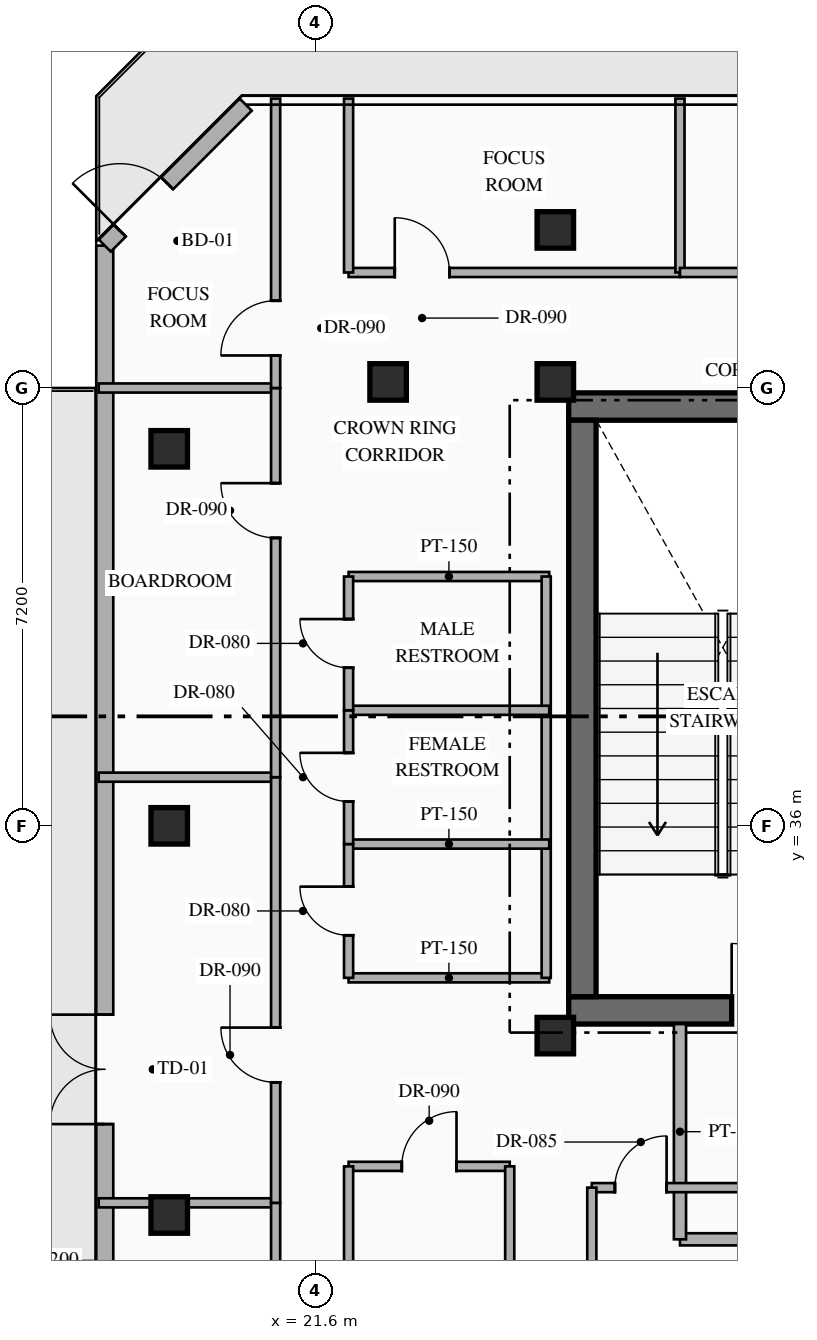
"""IFC4 building model, lengths in metres.
Left out: names, types, materials, properties, quantities, classifications, styles, units other than length and angle.
Written with IfcOpenShell. Run it as: python <this file> out.ifc"""

import sys

from ifc_helpers import new_model, si_unit, direction, frame, frame_2d, origin, origin_2d, place, context, subcontext, project, spatial, rectangle, hollow_rectangle, extrude, element, fill, save


model = new_model("IFC4")
c1 = context("Model", 3, precision=1e-05, world=origin(), true_north=direction((0.0, 1.0)))
c2 = subcontext(c1, "Body", "Model", "MODEL_VIEW")
j1 = project(units=[si_unit("LENGTHUNIT", "METRE"), si_unit("PLANEANGLEUNIT", "RADIAN")], contexts=[c1])
p1 = place(None, origin())
s1 = spatial("IfcSite", under=j1, at=p1, CompositionType="ELEMENT")
p2 = place(p1, origin())
s2 = spatial("IfcBuilding", under=s1, at=p2, CompositionType="ELEMENT")
p3 = place(p2, frame((0.0, 0.0, 265.95)))
s3 = spatial("IfcBuildingStorey", under=s2, at=p3, CompositionType="ELEMENT", Elevation=265.95)
p4 = place(p3, frame((25.77, 32.965, 0.0), z_axis=(0.0, 0.0, 1.0), x_axis=(1.0, 0.0, 0.0)))
e1 = element("IfcWall", 1, at=p4, inside=s3, PredefinedType="SHEAR", context=c2, shape_type="SweptSolid", body=[
    extrude(rectangle(XDim=7.48, YDim=0.45, at=frame_2d((3.74, 0.0))), origin(), (0.0, 0.0, 1.0), 4.0),
])
p5 = place(p4, frame((2.68, 0.0, 0.0)))
e2 = element("IfcOpeningElement", 2, at=p5, cuts=e1, PredefinedType="OPENING", context=c2, shape_type="SweptSolid", body=[
    extrude(rectangle(XDim=1.1, YDim=2.2, at=frame_2d((0.55, 1.1))), frame((0.0, 0.235, 0.0), z_axis=(0.0, -1.0, 0.0), x_axis=(1.0, 0.0, 0.0)), (0.0, 0.0, 1.0), 0.47),
])
p6 = place(p4, frame((5.43, 0.0, 0.0)))
e3 = element("IfcOpeningElement", 3, at=p6, cuts=e1, PredefinedType="OPENING", context=c2, shape_type="SweptSolid", body=[
    extrude(rectangle(XDim=1.1, YDim=2.15, at=frame_2d((0.55, 1.075))), frame((0.0, 0.235, 0.0), z_axis=(0.0, -1.0, 0.0), x_axis=(1.0, 0.0, 0.0)), (0.0, 0.0, 1.0), 0.47),
])
p7 = place(p3, frame((25.77, 42.895, 0.0), z_axis=(0.0, 0.0, 1.0), x_axis=(1.0, 0.0, 0.0)))
e4 = element("IfcWall", 4, at=p7, inside=s3, PredefinedType="SHEAR", context=c2, shape_type="SweptSolid", body=[
    extrude(rectangle(XDim=7.48, YDim=0.45, at=frame_2d((3.74, 0.0))), origin(), (0.0, 0.0, 1.0), 4.0),
])
p8 = place(p3, frame((25.995, 33.19, 0.0), z_axis=(0.0, 0.0, 1.0), x_axis=(0.0, 1.0, 0.0)))
e5 = element("IfcWall", 5, at=p8, inside=s3, PredefinedType="SHEAR", context=c2, shape_type="SweptSolid", body=[
    extrude(rectangle(XDim=9.48, YDim=0.45, at=frame_2d((4.74, 0.0))), origin(), (0.0, 0.0, 1.0), 4.0),
])
for number, where, z_axis, x_axis in (
    (6, (25.55, 32.55, 0.0), (0.0, 0.0, 1.0), (1.0, 0.0, 0.0)),
    (7, (25.55, 43.3, 0.0), (0.0, 0.0, 1.0), (1.0, 0.0, 0.0)),
    (8, (25.55, 45.8, 0.0), (0.0, 0.0, 1.0), (1.0, 0.0, 0.0)),
    (9, (19.2, 29.6, 0.0), (0.0, 0.0, 1.0), (1.0, 0.0, 0.0)),
    (10, (19.2, 42.2, 0.0), (0.0, 0.0, 1.0), (1.0, 0.0, 0.0)),
    (11, (22.8, 43.3, 0.0), (0.0, 0.0, 1.0), (1.0, 0.0, 0.0)),
    (12, (19.2, 36.0, 0.0), (0.0, 0.0, 1.0), (1.0, 0.0, 0.0)),
):
    element("IfcColumn", number, at=place(p3, frame(where, z_axis=z_axis, x_axis=x_axis)), inside=s3, PredefinedType="COLUMN", context=c2, shape_type="SweptSolid", body=[
        extrude(hollow_rectangle(XDim=0.6, YDim=0.6, WallThickness=0.025, at=origin_2d()), origin(), (0.0, 0.0, 1.0), 4.0),
    ])
p9 = place(p3, frame((18.14, 25.858, 0.0), z_axis=(0.0, 0.0, 1.0), x_axis=(0.0, 1.0, 0.0)))
e13 = element("IfcWall", 13, at=p9, inside=s3, PredefinedType="STANDARD", context=c2, shape_type="SweptSolid", body=[
    extrude(rectangle(XDim=19.684, YDim=0.28, at=frame_2d((9.842, 0.0))), origin(), (0.0, 0.0, 1.0), 3.75),
])
p10 = place(p9, frame((5.237, 0.0, 0.0)))
e14 = element("IfcOpeningElement", 14, at=p10, cuts=e13, PredefinedType="OPENING", context=c2, shape_type="SweptSolid", body=[
    extrude(rectangle(XDim=1.8, YDim=2.25, at=frame_2d((0.9, 1.125))), frame((0.0, 0.15, 0.0), z_axis=(0.0, -1.0, 0.0), x_axis=(1.0, 0.0, 0.0)), (0.0, 0.0, 1.0), 0.3),
])
p11 = place(p3, frame((18.14, 45.542, 0.0), z_axis=(0.0, 0.0, 1.0), x_axis=(0.707106781187, 0.707106781187, 0.0)))
e15 = element("IfcWall", 15, at=p11, inside=s3, PredefinedType="STANDARD", context=c2, shape_type="SweptSolid", body=[
    extrude(rectangle(XDim=3.278, YDim=0.28, at=frame_2d((1.639, 0.0))), origin(), (0.0, 0.0, 1.0), 3.75),
])
p12 = place(p11, frame((0.35, 0.0, 0.0)))
e16 = element("IfcOpeningElement", 16, at=p12, cuts=e15, PredefinedType="OPENING", context=c2, shape_type="SweptSolid", body=[
    extrude(rectangle(XDim=1.1, YDim=2.2, at=frame_2d((0.55, 1.1))), frame((0.0, 0.15, 0.0), z_axis=(0.0, -1.0, 0.0), x_axis=(1.0, 0.0, 0.0)), (0.0, 0.0, 1.0), 0.3),
])
p13 = place(p3, frame((27.6, 29.2, 0.0), z_axis=(0.0, 0.0, 1.0), x_axis=(1.0, 0.0, 0.0)))
e17 = element("IfcWall", 17, at=p13, inside=s3, PredefinedType="STANDARD", context=c2, shape_type="SweptSolid", body=[
    extrude(rectangle(XDim=5.15, YDim=0.2, at=frame_2d((2.575, 0.0))), origin(), (0.0, 0.0, 1.0), 3.75),
])
p14 = place(p3, frame((27.6, 29.2, 0.0), z_axis=(0.0, 0.0, 1.0), x_axis=(0.0, 1.0, 0.0)))
e18 = element("IfcWall", 18, at=p14, inside=s3, PredefinedType="STANDARD", context=c2, shape_type="SweptSolid", body=[
    extrude(rectangle(XDim=3.54, YDim=0.2, at=frame_2d((1.77, 0.0))), origin(), (0.0, 0.0, 1.0), 3.75),
])
for number, where, z_axis, x_axis in (
    (19, (22.15, 33.5, 0.0), (0.0, 0.0, 1.0), (1.0, 0.0, 0.0)),
    (20, (22.15, 40.1, 0.0), (0.0, 0.0, 1.0), (1.0, 0.0, 0.0)),
):
    element("IfcWall", number, at=place(p3, frame(where, z_axis=z_axis, x_axis=x_axis)), inside=s3, PredefinedType="PARTITIONING", context=c2, shape_type="SweptSolid", body=[
        extrude(rectangle(XDim=3.3, YDim=0.15, at=frame_2d((1.65, 0.0))), origin(), (0.0, 0.0, 1.0), 3.75),
    ])
p15 = place(p3, frame((25.4, 33.5, 0.0), z_axis=(0.0, 0.0, 1.0), x_axis=(0.0, 1.0, 0.0)))
e21 = element("IfcWall", 21, at=p15, inside=s3, PredefinedType="PARTITIONING", context=c2, shape_type="SweptSolid", body=[
    extrude(rectangle(XDim=6.6, YDim=0.15, at=frame_2d((3.3, 0.0))), origin(), (0.0, 0.0, 1.0), 3.75),
])
for number, where, z_axis, x_axis in (
    (22, (22.15, 35.7, 0.0), (0.0, 0.0, 1.0), (1.0, 0.0, 0.0)),
    (23, (22.15, 37.9, 0.0), (0.0, 0.0, 1.0), (1.0, 0.0, 0.0)),
):
    element("IfcWall", number, at=place(p3, frame(where, z_axis=z_axis, x_axis=x_axis)), inside=s3, PredefinedType="PARTITIONING", context=c2, shape_type="SweptSolid", body=[
        extrude(rectangle(XDim=3.3, YDim=0.15, at=frame_2d((1.65, 0.0))), origin(), (0.0, 0.0, 1.0), 3.75),
    ])
p16 = place(p3, frame((22.15, 33.5, 0.0), z_axis=(0.0, 0.0, 1.0), x_axis=(0.0, 1.0, 0.0)))
e24 = element("IfcWall", 24, at=p16, inside=s3, PredefinedType="PARTITIONING", context=c2, shape_type="SweptSolid", body=[
    extrude(rectangle(XDim=2.2, YDim=0.15, at=frame_2d((1.1, 0.0))), origin(), (0.0, 0.0, 1.0), 3.75),
])
p17 = place(p16, frame((0.7, 0.0, 0.0)))
e25 = element("IfcOpeningElement", 25, at=p17, cuts=e24, PredefinedType="OPENING", context=c2, shape_type="SweptSolid", body=[
    extrude(rectangle(XDim=0.8, YDim=2.06, at=frame_2d((0.4, 1.03))), frame((0.0, 0.085, 0.0), z_axis=(0.0, -1.0, 0.0), x_axis=(1.0, 0.0, 0.0)), (0.0, 0.0, 1.0), 0.17),
])
p18 = place(p3, frame((22.15, 35.7, 0.0), z_axis=(0.0, 0.0, 1.0), x_axis=(0.0, 1.0, 0.0)))
e26 = element("IfcWall", 26, at=p18, inside=s3, PredefinedType="PARTITIONING", context=c2, shape_type="SweptSolid", body=[
    extrude(rectangle(XDim=2.2, YDim=0.15, at=frame_2d((1.1, 0.0))), origin(), (0.0, 0.0, 1.0), 3.75),
])
p19 = place(p18, frame((0.7, 0.0, 0.0)))
e27 = element("IfcOpeningElement", 27, at=p19, cuts=e26, PredefinedType="OPENING", context=c2, shape_type="SweptSolid", body=[
    extrude(rectangle(XDim=0.8, YDim=2.06, at=frame_2d((0.4, 1.03))), frame((0.0, 0.085, 0.0), z_axis=(0.0, -1.0, 0.0), x_axis=(1.0, 0.0, 0.0)), (0.0, 0.0, 1.0), 0.17),
])
p20 = place(p3, frame((22.15, 37.9, 0.0), z_axis=(0.0, 0.0, 1.0), x_axis=(0.0, 1.0, 0.0)))
e28 = element("IfcWall", 28, at=p20, inside=s3, PredefinedType="PARTITIONING", context=c2, shape_type="SweptSolid", body=[
    extrude(rectangle(XDim=2.2, YDim=0.15, at=frame_2d((1.1, 0.0))), origin(), (0.0, 0.0, 1.0), 3.75),
])
p21 = place(p20, frame((0.7, 0.0, 0.0)))
e29 = element("IfcOpeningElement", 29, at=p21, cuts=e28, PredefinedType="OPENING", context=c2, shape_type="SweptSolid", body=[
    extrude(rectangle(XDim=0.8, YDim=2.06, at=frame_2d((0.4, 1.03))), frame((0.0, 0.085, 0.0), z_axis=(0.0, -1.0, 0.0), x_axis=(1.0, 0.0, 0.0)), (0.0, 0.0, 1.0), 0.17),
])
p22 = place(p3, frame((26.15, 30.05, 0.0), z_axis=(0.0, 0.0, 1.0), x_axis=(1.0, 0.0, 0.0)))
e30 = element("IfcWall", 30, at=p22, inside=s3, PredefinedType="PARTITIONING", context=c2, shape_type="SweptSolid", body=[
    extrude(rectangle(XDim=7.7, YDim=0.15, at=frame_2d((3.85, 0.0))), origin(), (0.0, 0.0, 1.0), 3.75),
])
p23 = place(p22, frame((0.38, 0.0, 0.0)))
e31 = element("IfcOpeningElement", 31, at=p23, cuts=e30, PredefinedType="OPENING", context=c2, shape_type="SweptSolid", body=[
    extrude(rectangle(XDim=0.85, YDim=2.08, at=frame_2d((0.425, 1.04))), frame((0.0, 0.085, 0.0), z_axis=(0.0, -1.0, 0.0), x_axis=(1.0, 0.0, 0.0)), (0.0, 0.0, 1.0), 0.17),
])
p24 = place(p3, frame((26.15, 23.4, 0.0), z_axis=(0.0, 0.0, 1.0), x_axis=(0.0, 1.0, 0.0)))
e32 = element("IfcWall", 32, at=p24, inside=s3, PredefinedType="PARTITIONING", context=c2, shape_type="SweptSolid", body=[
    extrude(rectangle(XDim=6.65, YDim=0.15, at=frame_2d((3.325, 0.0))), origin(), (0.0, 0.0, 1.0), 3.75),
])
p25 = place(p3, frame((22.15, 45.1, 0.0), z_axis=(0.0, 0.0, 1.0), x_axis=(1.0, 0.0, 0.0)))
e33 = element("IfcWall", 33, at=p25, inside=s3, PredefinedType="PARTITIONING", context=c2, shape_type="SweptSolid", body=[
    extrude(rectangle(XDim=5.45, YDim=0.15, at=frame_2d((2.725, 0.0))), origin(), (0.0, 0.0, 1.0), 3.75),
])
p26 = place(p25, frame((0.759, 0.0, 0.0)))
e34 = element("IfcOpeningElement", 34, at=p26, cuts=e33, PredefinedType="OPENING", context=c2, shape_type="SweptSolid", body=[
    extrude(rectangle(XDim=0.9, YDim=2.15, at=frame_2d((0.45, 1.075))), frame((0.0, 0.085, 0.0), z_axis=(0.0, -1.0, 0.0), x_axis=(1.0, 0.0, 0.0)), (0.0, 0.0, 1.0), 0.17),
])
for number, where, z_axis, x_axis in (
    (35, (22.15, 45.1, 0.0), (0.0, 0.0, 1.0), (0.0, 1.0, 0.0)),
    (36, (27.6, 45.1, 0.0), (0.0, 0.0, 1.0), (0.0, 1.0, 0.0)),
):
    element("IfcWall", number, at=place(p3, frame(where, z_axis=z_axis, x_axis=x_axis)), inside=s3, PredefinedType="PARTITIONING", context=c2, shape_type="SweptSolid", body=[
        extrude(rectangle(XDim=2.86, YDim=0.15, at=frame_2d((1.43, 0.0))), origin(), (0.0, 0.0, 1.0), 3.75),
    ])
p27 = place(p3, frame((27.6, 45.1, 0.0), z_axis=(0.0, 0.0, 1.0), x_axis=(1.0, 0.0, 0.0)))
e37 = element("IfcWall", 37, at=p27, inside=s3, PredefinedType="PARTITIONING", context=c2, shape_type="SweptSolid", body=[
    extrude(rectangle(XDim=5.8, YDim=0.15, at=frame_2d((2.9, 0.0))), origin(), (0.0, 0.0, 1.0), 3.75),
])
p28 = place(p27, frame((2.45, 0.0, 0.0)))
e38 = element("IfcOpeningElement", 38, at=p28, cuts=e37, PredefinedType="OPENING", context=c2, shape_type="SweptSolid", body=[
    extrude(rectangle(XDim=0.9, YDim=2.15, at=frame_2d((0.45, 1.075))), frame((0.0, 0.085, 0.0), z_axis=(0.0, -1.0, 0.0), x_axis=(1.0, 0.0, 0.0)), (0.0, 0.0, 1.0), 0.17),
])
p29 = place(p3, frame((18.04, 29.8, 0.0), z_axis=(0.0, 0.0, 1.0), x_axis=(1.0, 0.0, 0.0)))
e39 = element("IfcWall", 39, at=p29, inside=s3, PredefinedType="PARTITIONING", context=c2, shape_type="SweptSolid", body=[
    extrude(rectangle(XDim=2.91, YDim=0.15, at=frame_2d((1.455, 0.0))), origin(), (0.0, 0.0, 1.0), 3.75),
])
p30 = place(p3, frame((20.95, 23.44, 0.0), z_axis=(0.0, 0.0, 1.0), x_axis=(0.0, 1.0, 0.0)))
e40 = element("IfcWall", 40, at=p30, inside=s3, PredefinedType="PARTITIONING", context=c2, shape_type="SweptSolid", body=[
    extrude(rectangle(XDim=6.36, YDim=0.15, at=frame_2d((3.18, 0.0))), origin(), (0.0, 0.0, 1.0), 3.75),
])
p31 = place(p30, frame((2.73, 0.0, 0.0)))
e41 = element("IfcOpeningElement", 41, at=p31, cuts=e40, PredefinedType="OPENING", context=c2, shape_type="SweptSolid", body=[
    extrude(rectangle(XDim=0.9, YDim=2.15, at=frame_2d((0.45, 1.075))), frame((0.0, 0.085, 0.0), z_axis=(0.0, -1.0, 0.0), x_axis=(1.0, 0.0, 0.0)), (0.0, 0.0, 1.0), 0.17),
])
p32 = place(p3, frame((18.04, 36.8, 0.0), z_axis=(0.0, 0.0, 1.0), x_axis=(1.0, 0.0, 0.0)))
e42 = element("IfcWall", 42, at=p32, inside=s3, PredefinedType="PARTITIONING", context=c2, shape_type="SweptSolid", body=[
    extrude(rectangle(XDim=2.91, YDim=0.15, at=frame_2d((1.455, 0.0))), origin(), (0.0, 0.0, 1.0), 3.75),
])
p33 = place(p3, frame((20.95, 29.8, 0.0), z_axis=(0.0, 0.0, 1.0), x_axis=(0.0, 1.0, 0.0)))
e43 = element("IfcWall", 43, at=p33, inside=s3, PredefinedType="PARTITIONING", context=c2, shape_type="SweptSolid", body=[
    extrude(rectangle(XDim=7.0, YDim=0.15, at=frame_2d((3.5, 0.0))), origin(), (0.0, 0.0, 1.0), 3.75),
])
p34 = place(p33, frame((1.982, 0.0, 0.0)))
e44 = element("IfcOpeningElement", 44, at=p34, cuts=e43, PredefinedType="OPENING", context=c2, shape_type="SweptSolid", body=[
    extrude(rectangle(XDim=0.9, YDim=2.15, at=frame_2d((0.45, 1.075))), frame((0.0, 0.085, 0.0), z_axis=(0.0, -1.0, 0.0), x_axis=(1.0, 0.0, 0.0)), (0.0, 0.0, 1.0), 0.17),
])
p35 = place(p3, frame((18.04, 43.2, 0.0), z_axis=(0.0, 0.0, 1.0), x_axis=(1.0, 0.0, 0.0)))
e45 = element("IfcWall", 45, at=p35, inside=s3, PredefinedType="PARTITIONING", context=c2, shape_type="SweptSolid", body=[
    extrude(rectangle(XDim=2.91, YDim=0.15, at=frame_2d((1.455, 0.0))), origin(), (0.0, 0.0, 1.0), 3.75),
])
p36 = place(p3, frame((20.95, 36.8, 0.0), z_axis=(0.0, 0.0, 1.0), x_axis=(0.0, 1.0, 0.0)))
e46 = element("IfcWall", 46, at=p36, inside=s3, PredefinedType="PARTITIONING", context=c2, shape_type="SweptSolid", body=[
    extrude(rectangle(XDim=6.4, YDim=0.15, at=frame_2d((3.2, 0.0))), origin(), (0.0, 0.0, 1.0), 3.75),
])
p37 = place(p36, frame((3.935, 0.0, 0.0)))
e47 = element("IfcOpeningElement", 47, at=p37, cuts=e46, PredefinedType="OPENING", context=c2, shape_type="SweptSolid", body=[
    extrude(rectangle(XDim=0.9, YDim=2.15, at=frame_2d((0.45, 1.075))), frame((0.0, 0.085, 0.0), z_axis=(0.0, -1.0, 0.0), x_axis=(1.0, 0.0, 0.0)), (0.0, 0.0, 1.0), 0.17),
])
p38 = place(p3, frame((20.95, 43.2, 0.0), z_axis=(0.0, 0.0, 1.0), x_axis=(0.0, 1.0, 0.0)))
e48 = element("IfcWall", 48, at=p38, inside=s3, PredefinedType="PARTITIONING", context=c2, shape_type="SweptSolid", body=[
    extrude(rectangle(XDim=4.76, YDim=0.15, at=frame_2d((2.38, 0.0))), origin(), (0.0, 0.0, 1.0), 3.75),
])
p39 = place(p38, frame((0.535, 0.0, 0.0)))
e49 = element("IfcOpeningElement", 49, at=p39, cuts=e48, PredefinedType="OPENING", context=c2, shape_type="SweptSolid", body=[
    extrude(rectangle(XDim=0.9, YDim=2.15, at=frame_2d((0.45, 1.075))), frame((0.0, 0.085, 0.0), z_axis=(0.0, -1.0, 0.0), x_axis=(1.0, 0.0, 0.0)), (0.0, 0.0, 1.0), 0.17),
])
p40 = place(p3, frame((22.15, 30.4, 0.0), z_axis=(0.0, 0.0, 1.0), x_axis=(1.0, 0.0, 0.0)))
e50 = element("IfcWall", 50, at=p40, inside=s3, PredefinedType="PARTITIONING", context=c2, shape_type="SweptSolid", body=[
    extrude(rectangle(XDim=2.65, YDim=0.15, at=frame_2d((1.325, 0.0))), origin(), (0.0, 0.0, 1.0), 3.75),
])
p41 = place(p40, frame((0.875, 0.0, 0.0)))
e51 = element("IfcOpeningElement", 51, at=p41, cuts=e50, PredefinedType="OPENING", context=c2, shape_type="SweptSolid", body=[
    extrude(rectangle(XDim=0.9, YDim=2.15, at=frame_2d((0.45, 1.075))), frame((0.0, 0.085, 0.0), z_axis=(0.0, -1.0, 0.0), x_axis=(1.0, 0.0, 0.0)), (0.0, 0.0, 1.0), 0.17),
])
for number, where, z_axis, x_axis in (
    (52, (22.15, 23.44, 0.0), (0.0, 0.0, 1.0), (0.0, 1.0, 0.0)),
    (53, (24.8, 23.44, 0.0), (0.0, 0.0, 1.0), (0.0, 1.0, 0.0)),
):
    element("IfcWall", number, at=place(p3, frame(where, z_axis=z_axis, x_axis=x_axis)), inside=s3, PredefinedType="PARTITIONING", context=c2, shape_type="SweptSolid", body=[
        extrude(rectangle(XDim=6.96, YDim=0.15, at=frame_2d((3.48, 0.0))), origin(), (0.0, 0.0, 1.0), 3.75),
    ])
p42 = place(p10, origin())
e54 = element("IfcDoor", 54, at=p42, inside=s3, OperationType="DOUBLE_DOOR_SINGLE_SWING", PredefinedType="DOOR", context=c2, shape_type="SweptSolid", body=[
    extrude(rectangle(XDim=1.8, YDim=2.25, at=frame_2d((0.9, 1.125))), frame((0.0, 0.025, 0.0), z_axis=(0.0, -1.0, 0.0), x_axis=(1.0, 0.0, 0.0)), (0.0, 0.0, 1.0), 0.05),
])
fill(e14, e54)
p43 = place(p12, origin())
e55 = element("IfcDoor", 55, at=p43, inside=s3, OperationType="SINGLE_SWING_LEFT", PredefinedType="DOOR", context=c2, shape_type="SweptSolid", body=[
    extrude(rectangle(XDim=1.1, YDim=2.2, at=frame_2d((0.55, 1.1))), frame((0.0, 0.025, 0.0), z_axis=(0.0, -1.0, 0.0), x_axis=(1.0, 0.0, 0.0)), (0.0, 0.0, 1.0), 0.05),
])
fill(e16, e55)
p44 = place(p5, origin())
e56 = element("IfcDoor", 56, at=p44, inside=s3, OperationType="SINGLE_SWING_LEFT", PredefinedType="DOOR", context=c2, shape_type="SweptSolid", body=[
    extrude(rectangle(XDim=1.1, YDim=2.2, at=frame_2d((0.55, 1.1))), frame((0.0, 0.025, 0.0), z_axis=(0.0, -1.0, 0.0), x_axis=(1.0, 0.0, 0.0)), (0.0, 0.0, 1.0), 0.05),
])
fill(e2, e56)
p45 = place(p17, origin())
e57 = element("IfcDoor", 57, at=p45, inside=s3, OperationType="SINGLE_SWING_RIGHT", PredefinedType="DOOR", context=c2, shape_type="SweptSolid", body=[
    extrude(rectangle(XDim=0.8, YDim=2.06, at=frame_2d((0.4, 1.03))), frame((0.0, 0.025, 0.0), z_axis=(0.0, -1.0, 0.0), x_axis=(1.0, 0.0, 0.0)), (0.0, 0.0, 1.0), 0.05),
])
fill(e25, e57)
p46 = place(p19, origin())
e58 = element("IfcDoor", 58, at=p46, inside=s3, OperationType="SINGLE_SWING_RIGHT", PredefinedType="DOOR", context=c2, shape_type="SweptSolid", body=[
    extrude(rectangle(XDim=0.8, YDim=2.06, at=frame_2d((0.4, 1.03))), frame((0.0, 0.025, 0.0), z_axis=(0.0, -1.0, 0.0), x_axis=(1.0, 0.0, 0.0)), (0.0, 0.0, 1.0), 0.05),
])
fill(e27, e58)
p47 = place(p21, origin())
e59 = element("IfcDoor", 59, at=p47, inside=s3, OperationType="SINGLE_SWING_RIGHT", PredefinedType="DOOR", context=c2, shape_type="SweptSolid", body=[
    extrude(rectangle(XDim=0.8, YDim=2.06, at=frame_2d((0.4, 1.03))), frame((0.0, 0.025, 0.0), z_axis=(0.0, -1.0, 0.0), x_axis=(1.0, 0.0, 0.0)), (0.0, 0.0, 1.0), 0.05),
])
fill(e29, e59)
p48 = place(p23, origin())
e60 = element("IfcDoor", 60, at=p48, inside=s3, OperationType="SINGLE_SWING_RIGHT", PredefinedType="DOOR", context=c2, shape_type="SweptSolid", body=[
    extrude(rectangle(XDim=0.85, YDim=2.08, at=frame_2d((0.425, 1.04))), frame((0.0, 0.025, 0.0), z_axis=(0.0, -1.0, 0.0), x_axis=(1.0, 0.0, 0.0)), (0.0, 0.0, 1.0), 0.05),
])
fill(e31, e60)
p49 = place(p26, origin())
e61 = element("IfcDoor", 61, at=p49, inside=s3, OperationType="SINGLE_SWING_LEFT", PredefinedType="DOOR", context=c2, shape_type="SweptSolid", body=[
    extrude(rectangle(XDim=0.9, YDim=2.15, at=frame_2d((0.45, 1.075))), frame((0.0, 0.025, 0.0), z_axis=(0.0, -1.0, 0.0), x_axis=(1.0, 0.0, 0.0)), (0.0, 0.0, 1.0), 0.05),
])
fill(e34, e61)
p50 = place(p34, origin())
e62 = element("IfcDoor", 62, at=p50, inside=s3, OperationType="SINGLE_SWING_RIGHT", PredefinedType="DOOR", context=c2, shape_type="SweptSolid", body=[
    extrude(rectangle(XDim=0.9, YDim=2.15, at=frame_2d((0.45, 1.075))), frame((0.0, 0.025, 0.0), z_axis=(0.0, -1.0, 0.0), x_axis=(1.0, 0.0, 0.0)), (0.0, 0.0, 1.0), 0.05),
])
fill(e44, e62)
p51 = place(p37, origin())
e63 = element("IfcDoor", 63, at=p51, inside=s3, OperationType="SINGLE_SWING_RIGHT", PredefinedType="DOOR", context=c2, shape_type="SweptSolid", body=[
    extrude(rectangle(XDim=0.9, YDim=2.15, at=frame_2d((0.45, 1.075))), frame((0.0, 0.025, 0.0), z_axis=(0.0, -1.0, 0.0), x_axis=(1.0, 0.0, 0.0)), (0.0, 0.0, 1.0), 0.05),
])
fill(e47, e63)
p52 = place(p39, origin())
e64 = element("IfcDoor", 64, at=p52, inside=s3, OperationType="SINGLE_SWING_LEFT", PredefinedType="DOOR", context=c2, shape_type="SweptSolid", body=[
    extrude(rectangle(XDim=0.9, YDim=2.15, at=frame_2d((0.45, 1.075))), frame((0.0, 0.025, 0.0), z_axis=(0.0, -1.0, 0.0), x_axis=(1.0, 0.0, 0.0)), (0.0, 0.0, 1.0), 0.05),
])
fill(e49, e64)
p53 = place(p41, origin())
e65 = element("IfcDoor", 65, at=p53, inside=s3, OperationType="SINGLE_SWING_RIGHT", PredefinedType="DOOR", context=c2, shape_type="SweptSolid", body=[
    extrude(rectangle(XDim=0.9, YDim=2.15, at=frame_2d((0.45, 1.075))), frame((0.0, 0.025, 0.0), z_axis=(0.0, -1.0, 0.0), x_axis=(1.0, 0.0, 0.0)), (0.0, 0.0, 1.0), 0.05),
])
fill(e51, e65)
save(model, sys.argv[1])
